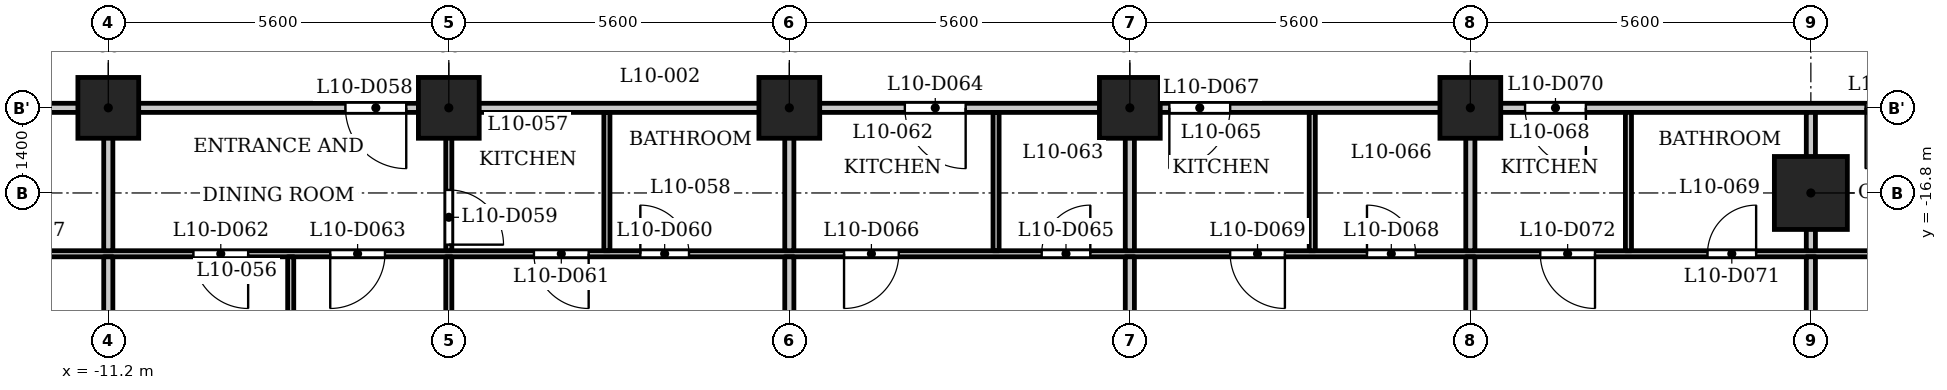
"""IFC4 building model, lengths in metres.
Left out: names, types, materials, properties, quantities, classifications, styles, units other than length and angle.
Written with IfcOpenShell. Run it as: python <this file> out.ifc"""

import sys

from ifc_helpers import new_model, si_unit, direction, frame, frame_2d, origin, origin_2d, place, context, subcontext, project, spatial, rectangle, extrude, element, fill, save


model = new_model("IFC4")
c1 = context("Model", 3, precision=1e-05, world=origin(), true_north=direction((0.0, 1.0)))
c2 = subcontext(c1, "Body", "Model", "MODEL_VIEW")
j1 = project(units=[si_unit("LENGTHUNIT", "METRE"), si_unit("PLANEANGLEUNIT", "RADIAN")], contexts=[c1])
p1 = place(None, origin())
s1 = spatial("IfcSite", under=j1, at=p1, CompositionType="ELEMENT")
p2 = place(p1, origin())
s2 = spatial("IfcBuilding", under=s1, at=p2, CompositionType="ELEMENT")
p3 = place(p2, frame((0.0, 0.0, 44.5)))
s3 = spatial("IfcBuildingStorey", under=s2, at=p3, CompositionType="ELEMENT", Elevation=44.5)
p4 = place(p3, frame((16.8, -16.8, 0.0), z_axis=(0.0, 0.0, 1.0), x_axis=(1.0, 0.0, 0.0)))
e1 = element("IfcColumn", 1, at=p4, inside=s3, PredefinedType="COLUMN", context=c2, shape_type="SweptSolid", body=[
    extrude(rectangle(XDim=1.2, YDim=1.2, at=origin_2d()), origin(), (0.0, 0.0, 1.0), 3.5),
])
for number, where, z_axis, x_axis in (
    (2, (-11.2, -15.4, 0.0), (0.0, 0.0, 1.0), (1.0, 0.0, 0.0)),
    (3, (-5.6, -15.4, 0.0), (0.0, 0.0, 1.0), (1.0, 0.0, 0.0)),
    (4, (0.0, -15.4, 0.0), (0.0, 0.0, 1.0), (1.0, 0.0, 0.0)),
    (5, (5.6, -15.4, 0.0), (0.0, 0.0, 1.0), (1.0, 0.0, 0.0)),
    (6, (11.2, -15.4, 0.0), (0.0, 0.0, 1.0), (1.0, 0.0, 0.0)),
):
    element("IfcColumn", number, at=place(p3, frame(where, z_axis=z_axis, x_axis=x_axis)), inside=s3, PredefinedType="COLUMN", context=c2, shape_type="SweptSolid", body=[
        extrude(rectangle(XDim=1.0, YDim=1.0, at=origin_2d()), origin(), (0.0, 0.0, 1.0), 3.5),
    ])
p5 = place(p3, frame((-26.394, -17.8, 0.0), z_axis=(0.0, 0.0, 1.0), x_axis=(1.0, 0.0, 0.0)))
e7 = element("IfcWall", 7, at=p5, inside=s3, PredefinedType="PARTITIONING", context=c2, shape_type="SweptSolid", body=[
    extrude(rectangle(XDim=53.126, YDim=0.1, at=frame_2d((26.563, 0.0))), origin(), (0.0, 0.0, 1.0), 3.2),
])
p6 = place(p5, frame((0.794, 0.0, 0.0)))
e8 = element("IfcOpeningElement", 8, at=p6, cuts=e7, PredefinedType="OPENING", context=c2, shape_type="SweptSolid", body=[
    extrude(rectangle(XDim=0.8, YDim=2.1, at=frame_2d((0.4, 1.05))), frame((0.0, 0.06, 0.0), z_axis=(0.0, -1.0, 0.0), x_axis=(1.0, 0.0, 0.0)), (0.0, 0.0, 1.0), 0.12),
])
p7 = place(p5, frame((5.644, 0.0, 0.0)))
e9 = element("IfcOpeningElement", 9, at=p7, cuts=e7, PredefinedType="OPENING", context=c2, shape_type="SweptSolid", body=[
    extrude(rectangle(XDim=0.9, YDim=2.1, at=frame_2d((0.45, 1.05))), frame((0.0, 0.06, 0.0), z_axis=(0.0, -1.0, 0.0), x_axis=(1.0, 0.0, 0.0)), (0.0, 0.0, 1.0), 0.12),
])
p8 = place(p5, frame((10.394, 0.0, 0.0)))
e10 = element("IfcOpeningElement", 10, at=p8, cuts=e7, PredefinedType="OPENING", context=c2, shape_type="SweptSolid", body=[
    extrude(rectangle(XDim=0.8, YDim=2.1, at=frame_2d((0.4, 1.05))), frame((0.0, 0.06, 0.0), z_axis=(0.0, -1.0, 0.0), x_axis=(1.0, 0.0, 0.0)), (0.0, 0.0, 1.0), 0.12),
])
p9 = place(p5, frame((13.244, 0.0, 0.0)))
e11 = element("IfcOpeningElement", 11, at=p9, cuts=e7, PredefinedType="OPENING", context=c2, shape_type="SweptSolid", body=[
    extrude(rectangle(XDim=0.9, YDim=2.1, at=frame_2d((0.45, 1.05))), frame((0.0, 0.06, 0.0), z_axis=(0.0, -1.0, 0.0), x_axis=(1.0, 0.0, 0.0)), (0.0, 0.0, 1.0), 0.12),
])
p10 = place(p5, frame((23.944, 0.0, 0.0)))
e12 = element("IfcOpeningElement", 12, at=p10, cuts=e7, PredefinedType="OPENING", context=c2, shape_type="SweptSolid", body=[
    extrude(rectangle(XDim=0.8, YDim=2.1, at=frame_2d((0.4, 1.05))), frame((0.0, 0.06, 0.0), z_axis=(0.0, -1.0, 0.0), x_axis=(1.0, 0.0, 0.0)), (0.0, 0.0, 1.0), 0.12),
])
p11 = place(p5, frame((22.194, 0.0, 0.0)))
e13 = element("IfcOpeningElement", 13, at=p11, cuts=e7, PredefinedType="OPENING", context=c2, shape_type="SweptSolid", body=[
    extrude(rectangle(XDim=0.9, YDim=2.1, at=frame_2d((0.45, 1.05))), frame((0.0, 0.06, 0.0), z_axis=(0.0, -1.0, 0.0), x_axis=(1.0, 0.0, 0.0)), (0.0, 0.0, 1.0), 0.12),
])
p12 = place(p5, frame((16.594, 0.0, 0.0)))
e14 = element("IfcOpeningElement", 14, at=p12, cuts=e7, PredefinedType="OPENING", context=c2, shape_type="SweptSolid", body=[
    extrude(rectangle(XDim=0.9, YDim=2.1, at=frame_2d((0.45, 1.05))), frame((0.0, 0.06, 0.0), z_axis=(0.0, -1.0, 0.0), x_axis=(1.0, 0.0, 0.0)), (0.0, 0.0, 1.0), 0.12),
])
p13 = place(p5, frame((18.844, 0.0, 0.0)))
e15 = element("IfcOpeningElement", 15, at=p13, cuts=e7, PredefinedType="OPENING", context=c2, shape_type="SweptSolid", body=[
    extrude(rectangle(XDim=0.9, YDim=2.1, at=frame_2d((0.45, 1.05))), frame((0.0, 0.06, 0.0), z_axis=(0.0, -1.0, 0.0), x_axis=(1.0, 0.0, 0.0)), (0.0, 0.0, 1.0), 0.12),
])
p14 = place(p5, frame((30.544, 0.0, 0.0)))
e16 = element("IfcOpeningElement", 16, at=p14, cuts=e7, PredefinedType="OPENING", context=c2, shape_type="SweptSolid", body=[
    extrude(rectangle(XDim=0.8, YDim=2.1, at=frame_2d((0.4, 1.05))), frame((0.0, 0.06, 0.0), z_axis=(0.0, -1.0, 0.0), x_axis=(1.0, 0.0, 0.0)), (0.0, 0.0, 1.0), 0.12),
])
p15 = place(p5, frame((27.294, 0.0, 0.0)))
e17 = element("IfcOpeningElement", 17, at=p15, cuts=e7, PredefinedType="OPENING", context=c2, shape_type="SweptSolid", body=[
    extrude(rectangle(XDim=0.9, YDim=2.1, at=frame_2d((0.45, 1.05))), frame((0.0, 0.06, 0.0), z_axis=(0.0, -1.0, 0.0), x_axis=(1.0, 0.0, 0.0)), (0.0, 0.0, 1.0), 0.12),
])
p16 = place(p5, frame((35.894, 0.0, 0.0)))
e18 = element("IfcOpeningElement", 18, at=p16, cuts=e7, PredefinedType="OPENING", context=c2, shape_type="SweptSolid", body=[
    extrude(rectangle(XDim=0.8, YDim=2.1, at=frame_2d((0.4, 1.05))), frame((0.0, 0.06, 0.0), z_axis=(0.0, -1.0, 0.0), x_axis=(1.0, 0.0, 0.0)), (0.0, 0.0, 1.0), 0.12),
])
p17 = place(p5, frame((33.644, 0.0, 0.0)))
e19 = element("IfcOpeningElement", 19, at=p17, cuts=e7, PredefinedType="OPENING", context=c2, shape_type="SweptSolid", body=[
    extrude(rectangle(XDim=0.9, YDim=2.1, at=frame_2d((0.45, 1.05))), frame((0.0, 0.06, 0.0), z_axis=(0.0, -1.0, 0.0), x_axis=(1.0, 0.0, 0.0)), (0.0, 0.0, 1.0), 0.12),
])
p18 = place(p5, frame((41.494, 0.0, 0.0)))
e20 = element("IfcOpeningElement", 20, at=p18, cuts=e7, PredefinedType="OPENING", context=c2, shape_type="SweptSolid", body=[
    extrude(rectangle(XDim=0.8, YDim=2.1, at=frame_2d((0.4, 1.05))), frame((0.0, 0.06, 0.0), z_axis=(0.0, -1.0, 0.0), x_axis=(1.0, 0.0, 0.0)), (0.0, 0.0, 1.0), 0.12),
])
p19 = place(p5, frame((38.744, 0.0, 0.0)))
e21 = element("IfcOpeningElement", 21, at=p19, cuts=e7, PredefinedType="OPENING", context=c2, shape_type="SweptSolid", body=[
    extrude(rectangle(XDim=0.9, YDim=2.1, at=frame_2d((0.45, 1.05))), frame((0.0, 0.06, 0.0), z_axis=(0.0, -1.0, 0.0), x_axis=(1.0, 0.0, 0.0)), (0.0, 0.0, 1.0), 0.12),
])
p20 = place(p5, frame((49.362, 0.0, 0.0)))
e22 = element("IfcOpeningElement", 22, at=p20, cuts=e7, PredefinedType="OPENING", context=c2, shape_type="SweptSolid", body=[
    extrude(rectangle(XDim=0.8, YDim=2.1, at=frame_2d((0.4, 1.05))), frame((0.0, 0.06, 0.0), z_axis=(0.0, -1.0, 0.0), x_axis=(1.0, 0.0, 0.0)), (0.0, 0.0, 1.0), 0.12),
])
p21 = place(p5, frame((45.094, 0.0, 0.0)))
e23 = element("IfcOpeningElement", 23, at=p21, cuts=e7, PredefinedType="OPENING", context=c2, shape_type="SweptSolid", body=[
    extrude(rectangle(XDim=0.9, YDim=2.1, at=frame_2d((0.45, 1.05))), frame((0.0, 0.06, 0.0), z_axis=(0.0, -1.0, 0.0), x_axis=(1.0, 0.0, 0.0)), (0.0, 0.0, 1.0), 0.12),
])
p22 = place(p3, frame((-27.484, -15.4, 0.0), z_axis=(0.0, 0.0, 1.0), x_axis=(1.0, 0.0, 0.0)))
e24 = element("IfcWall", 24, at=p22, inside=s3, PredefinedType="PARTITIONING", context=c2, shape_type="SweptSolid", body=[
    extrude(rectangle(XDim=54.968, YDim=0.15, at=frame_2d((27.484, 0.0))), origin(), (0.0, 0.0, 1.0), 3.2),
])
p23 = place(p22, frame((5.734, 0.0, 0.0)))
e25 = element("IfcOpeningElement", 25, at=p23, cuts=e24, PredefinedType="OPENING", context=c2, shape_type="SweptSolid", body=[
    extrude(rectangle(XDim=1.0, YDim=2.1, at=frame_2d((0.5, 1.05))), frame((0.0, 0.085, 0.0), z_axis=(0.0, -1.0, 0.0), x_axis=(1.0, 0.0, 0.0)), (0.0, 0.0, 1.0), 0.17),
])
p24 = place(p22, frame((13.334, 0.0, 0.0)))
e26 = element("IfcOpeningElement", 26, at=p24, cuts=e24, PredefinedType="OPENING", context=c2, shape_type="SweptSolid", body=[
    extrude(rectangle(XDim=1.0, YDim=2.1, at=frame_2d((0.5, 1.05))), frame((0.0, 0.085, 0.0), z_axis=(0.0, -1.0, 0.0), x_axis=(1.0, 0.0, 0.0)), (0.0, 0.0, 1.0), 0.17),
])
p25 = place(p22, frame((20.184, 0.0, 0.0)))
e27 = element("IfcOpeningElement", 27, at=p25, cuts=e24, PredefinedType="OPENING", context=c2, shape_type="SweptSolid", body=[
    extrude(rectangle(XDim=1.0, YDim=2.1, at=frame_2d((0.5, 1.05))), frame((0.0, 0.085, 0.0), z_axis=(0.0, -1.0, 0.0), x_axis=(1.0, 0.0, 0.0)), (0.0, 0.0, 1.0), 0.17),
])
p26 = place(p22, frame((29.384, 0.0, 0.0)))
e28 = element("IfcOpeningElement", 28, at=p26, cuts=e24, PredefinedType="OPENING", context=c2, shape_type="SweptSolid", body=[
    extrude(rectangle(XDim=1.0, YDim=2.1, at=frame_2d((0.5, 1.05))), frame((0.0, 0.085, 0.0), z_axis=(0.0, -1.0, 0.0), x_axis=(1.0, 0.0, 0.0)), (0.0, 0.0, 1.0), 0.17),
])
p27 = place(p22, frame((33.734, 0.0, 0.0)))
e29 = element("IfcOpeningElement", 29, at=p27, cuts=e24, PredefinedType="OPENING", context=c2, shape_type="SweptSolid", body=[
    extrude(rectangle(XDim=1.0, YDim=2.1, at=frame_2d((0.5, 1.05))), frame((0.0, 0.085, 0.0), z_axis=(0.0, -1.0, 0.0), x_axis=(1.0, 0.0, 0.0)), (0.0, 0.0, 1.0), 0.17),
])
p28 = place(p22, frame((39.584, 0.0, 0.0)))
e30 = element("IfcOpeningElement", 30, at=p28, cuts=e24, PredefinedType="OPENING", context=c2, shape_type="SweptSolid", body=[
    extrude(rectangle(XDim=1.0, YDim=2.1, at=frame_2d((0.5, 1.05))), frame((0.0, 0.085, 0.0), z_axis=(0.0, -1.0, 0.0), x_axis=(1.0, 0.0, 0.0)), (0.0, 0.0, 1.0), 0.17),
])
p29 = place(p22, frame((45.184, 0.0, 0.0)))
e31 = element("IfcOpeningElement", 31, at=p29, cuts=e24, PredefinedType="OPENING", context=c2, shape_type="SweptSolid", body=[
    extrude(rectangle(XDim=1.0, YDim=2.1, at=frame_2d((0.5, 1.05))), frame((0.0, 0.085, 0.0), z_axis=(0.0, -1.0, 0.0), x_axis=(1.0, 0.0, 0.0)), (0.0, 0.0, 1.0), 0.17),
])
p30 = place(p3, frame((-11.2, -23.13, 0.0), z_axis=(0.0, 0.0, 1.0), x_axis=(0.0, 1.0, 0.0)))
e32 = element("IfcWall", 32, at=p30, inside=s3, PredefinedType="PARTITIONING", context=c2, shape_type="SweptSolid", body=[
    extrude(rectangle(XDim=5.28, YDim=0.15, at=frame_2d((2.64, 0.0))), origin(), (0.0, 0.0, 1.0), 3.2),
])
p31 = place(p3, frame((-11.2, -17.75, 0.0), z_axis=(0.0, 0.0, 1.0), x_axis=(0.0, 1.0, 0.0)))
e33 = element("IfcWall", 33, at=p31, inside=s3, PredefinedType="PARTITIONING", context=c2, shape_type="SweptSolid", body=[
    extrude(rectangle(XDim=2.275, YDim=0.15, at=frame_2d((1.137, 0.0))), origin(), (0.0, 0.0, 1.0), 3.2),
])
p32 = place(p3, frame((-8.2, -22.08, 0.0), z_axis=(0.0, 0.0, 1.0), x_axis=(0.0, 1.0, 0.0)))
e34 = element("IfcWall", 34, at=p32, inside=s3, PredefinedType="PARTITIONING", context=c2, shape_type="SweptSolid", body=[
    extrude(rectangle(XDim=4.23, YDim=0.1, at=frame_2d((2.115, 0.0))), origin(), (0.0, 0.0, 1.0), 3.2),
])
p33 = place(p3, frame((-5.6, -23.13, 0.0), z_axis=(0.0, 0.0, 1.0), x_axis=(0.0, 1.0, 0.0)))
e35 = element("IfcWall", 35, at=p33, inside=s3, PredefinedType="PARTITIONING", context=c2, shape_type="SweptSolid", body=[
    extrude(rectangle(XDim=5.28, YDim=0.1, at=frame_2d((2.64, 0.0))), origin(), (0.0, 0.0, 1.0), 3.2),
])
p34 = place(p3, frame((-5.6, -17.75, 0.0), z_axis=(0.0, 0.0, 1.0), x_axis=(0.0, 1.0, 0.0)))
e36 = element("IfcWall", 36, at=p34, inside=s3, PredefinedType="PARTITIONING", context=c2, shape_type="SweptSolid", body=[
    extrude(rectangle(XDim=2.275, YDim=0.1, at=frame_2d((1.137, 0.0))), origin(), (0.0, 0.0, 1.0), 3.2),
])
p35 = place(p34, frame((0.1, 0.0, 0.0)))
e37 = element("IfcOpeningElement", 37, at=p35, cuts=e36, PredefinedType="OPENING", context=c2, shape_type="SweptSolid", body=[
    extrude(rectangle(XDim=0.9, YDim=2.1, at=frame_2d((0.45, 1.05))), frame((0.0, 0.06, 0.0), z_axis=(0.0, -1.0, 0.0), x_axis=(1.0, 0.0, 0.0)), (0.0, 0.0, 1.0), 0.12),
])
p36 = place(p3, frame((-3.0, -17.75, 0.0), z_axis=(0.0, 0.0, 1.0), x_axis=(0.0, 1.0, 0.0)))
e38 = element("IfcWall", 38, at=p36, inside=s3, PredefinedType="PARTITIONING", context=c2, shape_type="SweptSolid", body=[
    extrude(rectangle(XDim=2.275, YDim=0.1, at=frame_2d((1.137, 0.0))), origin(), (0.0, 0.0, 1.0), 3.2),
])
p37 = place(p3, frame((0.0, -23.13, 0.0), z_axis=(0.0, 0.0, 1.0), x_axis=(0.0, 1.0, 0.0)))
e39 = element("IfcWall", 39, at=p37, inside=s3, PredefinedType="PARTITIONING", context=c2, shape_type="SweptSolid", body=[
    extrude(rectangle(XDim=5.28, YDim=0.15, at=frame_2d((2.64, 0.0))), origin(), (0.0, 0.0, 1.0), 3.2),
])
p38 = place(p3, frame((0.0, -17.75, 0.0), z_axis=(0.0, 0.0, 1.0), x_axis=(0.0, 1.0, 0.0)))
e40 = element("IfcWall", 40, at=p38, inside=s3, PredefinedType="PARTITIONING", context=c2, shape_type="SweptSolid", body=[
    extrude(rectangle(XDim=2.275, YDim=0.15, at=frame_2d((1.137, 0.0))), origin(), (0.0, 0.0, 1.0), 3.2),
])
p39 = place(p3, frame((3.4, -17.75, 0.0), z_axis=(0.0, 0.0, 1.0), x_axis=(0.0, 1.0, 0.0)))
e41 = element("IfcWall", 41, at=p39, inside=s3, PredefinedType="PARTITIONING", context=c2, shape_type="SweptSolid", body=[
    extrude(rectangle(XDim=2.275, YDim=0.1, at=frame_2d((1.137, 0.0))), origin(), (0.0, 0.0, 1.0), 3.2),
])
p40 = place(p3, frame((5.6, -23.13, 0.0), z_axis=(0.0, 0.0, 1.0), x_axis=(0.0, 1.0, 0.0)))
e42 = element("IfcWall", 42, at=p40, inside=s3, PredefinedType="PARTITIONING", context=c2, shape_type="SweptSolid", body=[
    extrude(rectangle(XDim=5.28, YDim=0.15, at=frame_2d((2.64, 0.0))), origin(), (0.0, 0.0, 1.0), 3.2),
])
p41 = place(p3, frame((5.6, -17.75, 0.0), z_axis=(0.0, 0.0, 1.0), x_axis=(0.0, 1.0, 0.0)))
e43 = element("IfcWall", 43, at=p41, inside=s3, PredefinedType="PARTITIONING", context=c2, shape_type="SweptSolid", body=[
    extrude(rectangle(XDim=2.275, YDim=0.15, at=frame_2d((1.137, 0.0))), origin(), (0.0, 0.0, 1.0), 3.2),
])
p42 = place(p3, frame((8.6, -17.75, 0.0), z_axis=(0.0, 0.0, 1.0), x_axis=(0.0, 1.0, 0.0)))
e44 = element("IfcWall", 44, at=p42, inside=s3, PredefinedType="PARTITIONING", context=c2, shape_type="SweptSolid", body=[
    extrude(rectangle(XDim=2.275, YDim=0.1, at=frame_2d((1.137, 0.0))), origin(), (0.0, 0.0, 1.0), 3.2),
])
p43 = place(p3, frame((11.2, -23.13, 0.0), z_axis=(0.0, 0.0, 1.0), x_axis=(0.0, 1.0, 0.0)))
e45 = element("IfcWall", 45, at=p43, inside=s3, PredefinedType="PARTITIONING", context=c2, shape_type="SweptSolid", body=[
    extrude(rectangle(XDim=5.28, YDim=0.15, at=frame_2d((2.64, 0.0))), origin(), (0.0, 0.0, 1.0), 3.2),
])
p44 = place(p3, frame((11.2, -17.75, 0.0), z_axis=(0.0, 0.0, 1.0), x_axis=(0.0, 1.0, 0.0)))
e46 = element("IfcWall", 46, at=p44, inside=s3, PredefinedType="PARTITIONING", context=c2, shape_type="SweptSolid", body=[
    extrude(rectangle(XDim=2.275, YDim=0.15, at=frame_2d((1.137, 0.0))), origin(), (0.0, 0.0, 1.0), 3.2),
])
p45 = place(p3, frame((13.8, -17.75, 0.0), z_axis=(0.0, 0.0, 1.0), x_axis=(0.0, 1.0, 0.0)))
e47 = element("IfcWall", 47, at=p45, inside=s3, PredefinedType="PARTITIONING", context=c2, shape_type="SweptSolid", body=[
    extrude(rectangle(XDim=2.275, YDim=0.1, at=frame_2d((1.137, 0.0))), origin(), (0.0, 0.0, 1.0), 3.2),
])
p46 = place(p3, frame((16.8, -23.13, 0.0), z_axis=(0.0, 0.0, 1.0), x_axis=(0.0, 1.0, 0.0)))
e48 = element("IfcWall", 48, at=p46, inside=s3, PredefinedType="PARTITIONING", context=c2, shape_type="SweptSolid", body=[
    extrude(rectangle(XDim=5.28, YDim=0.15, at=frame_2d((2.64, 0.0))), origin(), (0.0, 0.0, 1.0), 3.2),
])
p47 = place(p3, frame((16.8, -17.75, 0.0), z_axis=(0.0, 0.0, 1.0), x_axis=(0.0, 1.0, 0.0)))
e49 = element("IfcWall", 49, at=p47, inside=s3, PredefinedType="PARTITIONING", context=c2, shape_type="SweptSolid", body=[
    extrude(rectangle(XDim=2.275, YDim=0.15, at=frame_2d((1.137, 0.0))), origin(), (0.0, 0.0, 1.0), 3.2),
])
p48 = place(p25, origin())
e50 = element("IfcDoor", 50, at=p48, inside=s3, OperationType="SINGLE_SWING_RIGHT", PredefinedType="DOOR", context=c2, shape_type="SweptSolid", body=[
    extrude(rectangle(XDim=1.0, YDim=2.1, at=frame_2d((0.5, 1.05))), frame((0.0, 0.025, 0.0), z_axis=(0.0, -1.0, 0.0), x_axis=(1.0, 0.0, 0.0)), (0.0, 0.0, 1.0), 0.05),
])
fill(e27, e50)
p49 = place(p35, origin())
e51 = element("IfcDoor", 51, at=p49, inside=s3, OperationType="SINGLE_SWING_LEFT", PredefinedType="DOOR", context=c2, shape_type="SweptSolid", body=[
    extrude(rectangle(XDim=0.9, YDim=2.1, at=frame_2d((0.45, 1.05))), frame((0.0, 0.025, 0.0), z_axis=(0.0, -1.0, 0.0), x_axis=(1.0, 0.0, 0.0)), (0.0, 0.0, 1.0), 0.05),
])
fill(e37, e51)
p50 = place(p10, origin())
e52 = element("IfcDoor", 52, at=p50, inside=s3, OperationType="SINGLE_SWING_RIGHT", PredefinedType="DOOR", context=c2, shape_type="SweptSolid", body=[
    extrude(rectangle(XDim=0.8, YDim=2.1, at=frame_2d((0.4, 1.05))), frame((0.0, 0.025, 0.0), z_axis=(0.0, -1.0, 0.0), x_axis=(1.0, 0.0, 0.0)), (0.0, 0.0, 1.0), 0.05),
])
fill(e12, e52)
p51 = place(p11, origin())
e53 = element("IfcDoor", 53, at=p51, inside=s3, OperationType="SINGLE_SWING_RIGHT", PredefinedType="DOOR", context=c2, shape_type="SweptSolid", body=[
    extrude(rectangle(XDim=0.9, YDim=2.1, at=frame_2d((0.45, 1.05))), frame((0.0, 0.025, 0.0), z_axis=(0.0, -1.0, 0.0), x_axis=(1.0, 0.0, 0.0)), (0.0, 0.0, 1.0), 0.05),
])
fill(e13, e53)
p52 = place(p12, origin())
e54 = element("IfcDoor", 54, at=p52, inside=s3, OperationType="SINGLE_SWING_RIGHT", PredefinedType="DOOR", context=c2, shape_type="SweptSolid", body=[
    extrude(rectangle(XDim=0.9, YDim=2.1, at=frame_2d((0.45, 1.05))), frame((0.0, 0.025, 0.0), z_axis=(0.0, -1.0, 0.0), x_axis=(1.0, 0.0, 0.0)), (0.0, 0.0, 1.0), 0.05),
])
fill(e14, e54)
p53 = place(p13, origin())
e55 = element("IfcDoor", 55, at=p53, inside=s3, OperationType="SINGLE_SWING_LEFT", PredefinedType="DOOR", context=c2, shape_type="SweptSolid", body=[
    extrude(rectangle(XDim=0.9, YDim=2.1, at=frame_2d((0.45, 1.05))), frame((0.0, 0.025, 0.0), z_axis=(0.0, -1.0, 0.0), x_axis=(1.0, 0.0, 0.0)), (0.0, 0.0, 1.0), 0.05),
])
fill(e15, e55)
p54 = place(p26, origin())
e56 = element("IfcDoor", 56, at=p54, inside=s3, OperationType="SINGLE_SWING_RIGHT", PredefinedType="DOOR", context=c2, shape_type="SweptSolid", body=[
    extrude(rectangle(XDim=1.0, YDim=2.1, at=frame_2d((0.5, 1.05))), frame((0.0, 0.025, 0.0), z_axis=(0.0, -1.0, 0.0), x_axis=(1.0, 0.0, 0.0)), (0.0, 0.0, 1.0), 0.05),
])
fill(e28, e56)
p55 = place(p14, origin())
e57 = element("IfcDoor", 57, at=p55, inside=s3, OperationType="SINGLE_SWING_LEFT", PredefinedType="DOOR", context=c2, shape_type="SweptSolid", body=[
    extrude(rectangle(XDim=0.8, YDim=2.1, at=frame_2d((0.4, 1.05))), frame((0.0, 0.025, 0.0), z_axis=(0.0, -1.0, 0.0), x_axis=(1.0, 0.0, 0.0)), (0.0, 0.0, 1.0), 0.05),
])
fill(e16, e57)
p56 = place(p15, origin())
e58 = element("IfcDoor", 58, at=p56, inside=s3, OperationType="SINGLE_SWING_LEFT", PredefinedType="DOOR", context=c2, shape_type="SweptSolid", body=[
    extrude(rectangle(XDim=0.9, YDim=2.1, at=frame_2d((0.45, 1.05))), frame((0.0, 0.025, 0.0), z_axis=(0.0, -1.0, 0.0), x_axis=(1.0, 0.0, 0.0)), (0.0, 0.0, 1.0), 0.05),
])
fill(e17, e58)
p57 = place(p27, origin())
e59 = element("IfcDoor", 59, at=p57, inside=s3, OperationType="SINGLE_SWING_LEFT", PredefinedType="DOOR", context=c2, shape_type="SweptSolid", body=[
    extrude(rectangle(XDim=1.0, YDim=2.1, at=frame_2d((0.5, 1.05))), frame((0.0, 0.025, 0.0), z_axis=(0.0, -1.0, 0.0), x_axis=(1.0, 0.0, 0.0)), (0.0, 0.0, 1.0), 0.05),
])
fill(e29, e59)
p58 = place(p16, origin())
e60 = element("IfcDoor", 60, at=p58, inside=s3, OperationType="SINGLE_SWING_RIGHT", PredefinedType="DOOR", context=c2, shape_type="SweptSolid", body=[
    extrude(rectangle(XDim=0.8, YDim=2.1, at=frame_2d((0.4, 1.05))), frame((0.0, 0.025, 0.0), z_axis=(0.0, -1.0, 0.0), x_axis=(1.0, 0.0, 0.0)), (0.0, 0.0, 1.0), 0.05),
])
fill(e18, e60)
p59 = place(p17, origin())
e61 = element("IfcDoor", 61, at=p59, inside=s3, OperationType="SINGLE_SWING_RIGHT", PredefinedType="DOOR", context=c2, shape_type="SweptSolid", body=[
    extrude(rectangle(XDim=0.9, YDim=2.1, at=frame_2d((0.45, 1.05))), frame((0.0, 0.025, 0.0), z_axis=(0.0, -1.0, 0.0), x_axis=(1.0, 0.0, 0.0)), (0.0, 0.0, 1.0), 0.05),
])
fill(e19, e61)
p60 = place(p28, origin())
e62 = element("IfcDoor", 62, at=p60, inside=s3, OperationType="SINGLE_SWING_RIGHT", PredefinedType="DOOR", context=c2, shape_type="SweptSolid", body=[
    extrude(rectangle(XDim=1.0, YDim=2.1, at=frame_2d((0.5, 1.05))), frame((0.0, 0.025, 0.0), z_axis=(0.0, -1.0, 0.0), x_axis=(1.0, 0.0, 0.0)), (0.0, 0.0, 1.0), 0.05),
])
fill(e30, e62)
p61 = place(p18, origin())
e63 = element("IfcDoor", 63, at=p61, inside=s3, OperationType="SINGLE_SWING_LEFT", PredefinedType="DOOR", context=c2, shape_type="SweptSolid", body=[
    extrude(rectangle(XDim=0.8, YDim=2.1, at=frame_2d((0.4, 1.05))), frame((0.0, 0.025, 0.0), z_axis=(0.0, -1.0, 0.0), x_axis=(1.0, 0.0, 0.0)), (0.0, 0.0, 1.0), 0.05),
])
fill(e20, e63)
p62 = place(p19, origin())
e64 = element("IfcDoor", 64, at=p62, inside=s3, OperationType="SINGLE_SWING_RIGHT", PredefinedType="DOOR", context=c2, shape_type="SweptSolid", body=[
    extrude(rectangle(XDim=0.9, YDim=2.1, at=frame_2d((0.45, 1.05))), frame((0.0, 0.025, 0.0), z_axis=(0.0, -1.0, 0.0), x_axis=(1.0, 0.0, 0.0)), (0.0, 0.0, 1.0), 0.05),
])
fill(e21, e64)
p63 = place(p29, origin())
e65 = element("IfcDoor", 65, at=p63, inside=s3, OperationType="SINGLE_SWING_LEFT", PredefinedType="DOOR", context=c2, shape_type="SweptSolid", body=[
    extrude(rectangle(XDim=1.0, YDim=2.1, at=frame_2d((0.5, 1.05))), frame((0.0, 0.025, 0.0), z_axis=(0.0, -1.0, 0.0), x_axis=(1.0, 0.0, 0.0)), (0.0, 0.0, 1.0), 0.05),
])
fill(e31, e65)
save(model, sys.argv[1])
